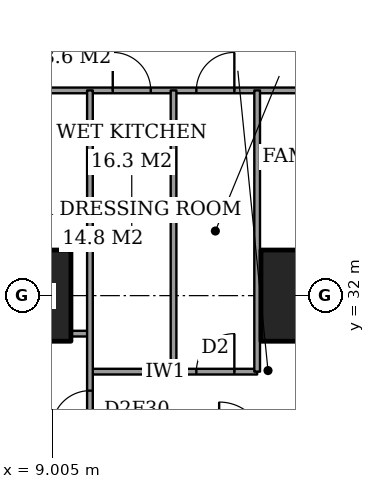
"""IFC4 building model, lengths in metres.
Left out: names, types, materials, properties, quantities, classifications, styles, units other than length and angle.
Written with IfcOpenShell. Run it as: python <this file> out.ifc"""

import sys

from ifc_helpers import new_model, si_unit, direction, frame, frame_2d, origin, origin_2d, place, context, subcontext, project, spatial, rectangle, extrude, element, fill, save


model = new_model("IFC4")
c1 = context("Model", 3, precision=1e-05, world=origin(), true_north=direction((0.0, 1.0)))
c2 = subcontext(c1, "Body", "Model", "MODEL_VIEW")
j1 = project(units=[si_unit("LENGTHUNIT", "METRE"), si_unit("PLANEANGLEUNIT", "RADIAN")], contexts=[c1])
p1 = place(None, origin())
s1 = spatial("IfcSite", under=j1, at=p1, CompositionType="ELEMENT")
p2 = place(p1, origin())
s2 = spatial("IfcBuilding", under=s1, at=p2, CompositionType="ELEMENT")
p3 = place(p2, frame((0.0, 0.0, 153.8)))
s3 = spatial("IfcBuildingStorey", under=s2, at=p3, CompositionType="ELEMENT", Elevation=153.8)
for number, where, z_axis, x_axis in (
    (1, (8.0, 32.0, 0.0), (0.0, 0.0, 1.0), (1.0, 0.0, 0.0)),
    (2, (16.0, 32.0, 0.0), (0.0, 0.0, 1.0), (1.0, 0.0, 0.0)),
):
    element("IfcColumn", number, at=place(p3, frame(where, z_axis=z_axis, x_axis=x_axis)), inside=s3, PredefinedType="COLUMN", context=c2, shape_type="SweptSolid", body=[
        extrude(rectangle(XDim=3.0, YDim=2.4, at=origin_2d()), origin(), (0.0, 0.0, 1.0), 3.6),
    ])
p4 = place(p3, frame((10.0, 30.0, 0.0), z_axis=(0.0, 0.0, 1.0), x_axis=(1.0, 0.0, 0.0)))
e3 = element("IfcWall", 3, at=p4, inside=s3, PredefinedType="PARTITIONING", context=c2, shape_type="SweptSolid", body=[
    extrude(rectangle(XDim=4.4, YDim=0.15, at=frame_2d((2.2, 0.0))), origin(), (0.0, 0.0, 1.0), 3.35),
])
p5 = place(p4, frame((2.8, 0.0, 0.0)))
e4 = element("IfcOpeningElement", 4, at=p5, cuts=e3, PredefinedType="OPENING", context=c2, shape_type="SweptSolid", body=[
    extrude(rectangle(XDim=1.0, YDim=2.1, at=frame_2d((0.5, 1.05))), frame((0.0, 0.085, 0.0), z_axis=(0.0, -1.0, 0.0), x_axis=(1.0, 0.0, 0.0)), (0.0, 0.0, 1.0), 0.17),
])
p6 = place(p3, frame((9.5, 31.0, 0.0), z_axis=(0.0, 0.0, 1.0), x_axis=(1.0, 0.0, 0.0)))
e5 = element("IfcWall", 5, at=p6, inside=s3, PredefinedType="PARTITIONING", context=c2, shape_type="SweptSolid", body=[
    extrude(rectangle(XDim=0.5, YDim=0.15, at=frame_2d((0.25, 0.0))), origin(), (0.0, 0.0, 1.0), 3.35),
])
p7 = place(p3, frame((-0.45, 37.4, 0.0), z_axis=(0.0, 0.0, 1.0), x_axis=(1.0, 0.0, 0.0)))
e6 = element("IfcWall", 6, at=p7, inside=s3, PredefinedType="PARTITIONING", context=c2, shape_type="SweptSolid", body=[
    extrude(rectangle(XDim=25.011, YDim=0.15, at=frame_2d((12.505, 0.0))), origin(), (0.0, 0.0, 1.0), 3.35),
])
p8 = place(p7, frame((13.25, 0.0, 0.0)))
e7 = element("IfcOpeningElement", 7, at=p8, cuts=e6, PredefinedType="OPENING", context=c2, shape_type="SweptSolid", body=[
    extrude(rectangle(XDim=1.0, YDim=2.1, at=frame_2d((0.5, 1.05))), frame((0.0, 0.085, 0.0), z_axis=(0.0, -1.0, 0.0), x_axis=(1.0, 0.0, 0.0)), (0.0, 0.0, 1.0), 0.17),
])
p9 = place(p7, frame((3.087, 0.0, 0.0)))
e8 = element("IfcOpeningElement", 8, at=p9, cuts=e6, PredefinedType="OPENING", context=c2, shape_type="SweptSolid", body=[
    extrude(rectangle(XDim=1.0, YDim=2.1, at=frame_2d((0.5, 1.05))), frame((0.0, 0.085, 0.0), z_axis=(0.0, -1.0, 0.0), x_axis=(1.0, 0.0, 0.0)), (0.0, 0.0, 1.0), 0.17),
])
p10 = place(p7, frame((11.05, 0.0, 0.0)))
e9 = element("IfcOpeningElement", 9, at=p10, cuts=e6, PredefinedType="OPENING", context=c2, shape_type="SweptSolid", body=[
    extrude(rectangle(XDim=1.0, YDim=2.1, at=frame_2d((0.5, 1.05))), frame((0.0, 0.085, 0.0), z_axis=(0.0, -1.0, 0.0), x_axis=(1.0, 0.0, 0.0)), (0.0, 0.0, 1.0), 0.17),
])
p11 = place(p7, frame((16.15, 0.0, 0.0)))
e10 = element("IfcOpeningElement", 10, at=p11, cuts=e6, PredefinedType="OPENING", context=c2, shape_type="SweptSolid", body=[
    extrude(rectangle(XDim=1.0, YDim=2.1, at=frame_2d((0.5, 1.05))), frame((0.0, 0.085, 0.0), z_axis=(0.0, -1.0, 0.0), x_axis=(1.0, 0.0, 0.0)), (0.0, 0.0, 1.0), 0.17),
])
p12 = place(p7, frame((21.175, 0.0, 0.0)))
e11 = element("IfcOpeningElement", 11, at=p12, cuts=e6, PredefinedType="OPENING", context=c2, shape_type="SweptSolid", body=[
    extrude(rectangle(XDim=1.0, YDim=2.1, at=frame_2d((0.5, 1.05))), frame((0.0, 0.085, 0.0), z_axis=(0.0, -1.0, 0.0), x_axis=(1.0, 0.0, 0.0)), (0.0, 0.0, 1.0), 0.17),
])
p13 = place(p3, frame((10.0, 28.0, 0.0), z_axis=(0.0, 0.0, 1.0), x_axis=(0.0, 1.0, 0.0)))
e12 = element("IfcWall", 12, at=p13, inside=s3, PredefinedType="PARTITIONING", context=c2, shape_type="SweptSolid", body=[
    extrude(rectangle(XDim=9.4, YDim=0.15, at=frame_2d((4.7, 0.0))), origin(), (0.0, 0.0, 1.0), 3.35),
])
p14 = place(p13, frame((0.5, 0.0, 0.0)))
e13 = element("IfcOpeningElement", 13, at=p14, cuts=e12, PredefinedType="OPENING", context=c2, shape_type="SweptSolid", body=[
    extrude(rectangle(XDim=1.0, YDim=2.1, at=frame_2d((0.5, 1.05))), frame((0.0, 0.085, 0.0), z_axis=(0.0, -1.0, 0.0), x_axis=(1.0, 0.0, 0.0)), (0.0, 0.0, 1.0), 0.17),
])
for number, where, z_axis, x_axis in (
    (14, (12.2, 30.0, 0.0), (0.0, 0.0, 1.0), (0.0, 1.0, 0.0)),
    (15, (14.4, 30.0, 0.0), (0.0, 0.0, 1.0), (0.0, 1.0, 0.0)),
):
    element("IfcWall", number, at=place(p3, frame(where, z_axis=z_axis, x_axis=x_axis)), inside=s3, PredefinedType="PARTITIONING", context=c2, shape_type="SweptSolid", body=[
        extrude(rectangle(XDim=7.4, YDim=0.15, at=frame_2d((3.7, 0.0))), origin(), (0.0, 0.0, 1.0), 3.35),
    ])
p15 = place(p8, origin())
e16 = element("IfcDoor", 16, at=p15, inside=s3, OperationType="SINGLE_SWING_LEFT", PredefinedType="DOOR", context=c2, shape_type="SweptSolid", body=[
    extrude(rectangle(XDim=1.0, YDim=2.1, at=frame_2d((0.5, 1.05))), frame((0.0, 0.025, 0.0), z_axis=(0.0, -1.0, 0.0), x_axis=(1.0, 0.0, 0.0)), (0.0, 0.0, 1.0), 0.05),
])
fill(e7, e16)
p16 = place(p14, origin())
e17 = element("IfcDoor", 17, at=p16, inside=s3, OperationType="SINGLE_SWING_RIGHT", PredefinedType="DOOR", context=c2, shape_type="SweptSolid", body=[
    extrude(rectangle(XDim=1.0, YDim=2.1, at=frame_2d((0.5, 1.05))), frame((0.0, 0.025, 0.0), z_axis=(0.0, -1.0, 0.0), x_axis=(1.0, 0.0, 0.0)), (0.0, 0.0, 1.0), 0.05),
])
fill(e13, e17)
p17 = place(p10, origin())
e18 = element("IfcDoor", 18, at=p17, inside=s3, OperationType="SINGLE_SWING_RIGHT", PredefinedType="DOOR", context=c2, shape_type="SweptSolid", body=[
    extrude(rectangle(XDim=1.0, YDim=2.1, at=frame_2d((0.5, 1.05))), frame((0.0, 0.025, 0.0), z_axis=(0.0, -1.0, 0.0), x_axis=(1.0, 0.0, 0.0)), (0.0, 0.0, 1.0), 0.05),
])
fill(e9, e18)
p18 = place(p5, origin())
e19 = element("IfcDoor", 19, at=p18, inside=s3, OperationType="SINGLE_SWING_LEFT", PredefinedType="DOOR", context=c2, shape_type="SweptSolid", body=[
    extrude(rectangle(XDim=1.0, YDim=2.1, at=frame_2d((0.5, 1.05))), frame((0.0, 0.025, 0.0), z_axis=(0.0, -1.0, 0.0), x_axis=(1.0, 0.0, 0.0)), (0.0, 0.0, 1.0), 0.05),
])
fill(e4, e19)
save(model, sys.argv[1])
